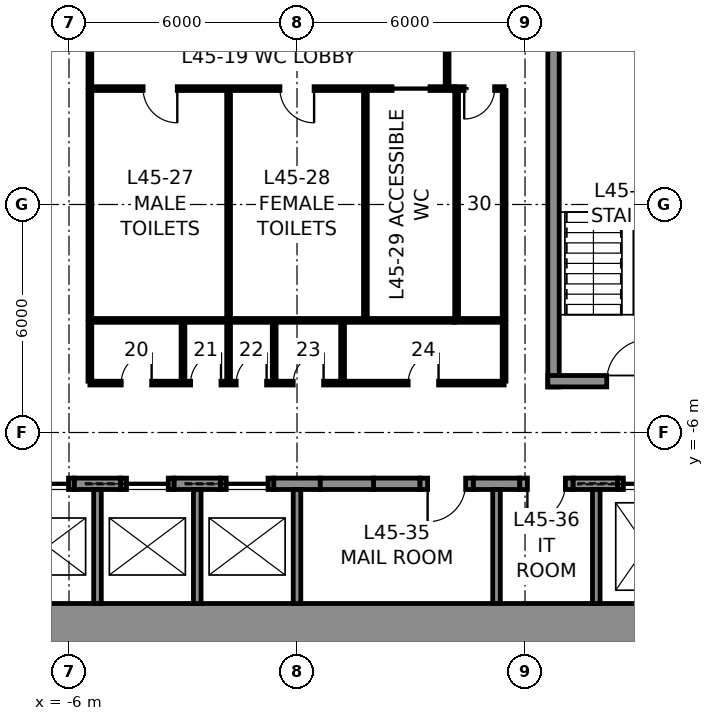
"""IFC4 building model, lengths in metres.
Left out: names, types, materials, properties, quantities, classifications, styles, units other than length and angle.
Written with IfcOpenShell. Run it as: python <this file> out.ifc"""

import sys

from ifc_helpers import new_model, si_unit, direction, frame, frame_2d, origin, place, context, subcontext, project, spatial, rectangle, extrude, element, fill, save


model = new_model("IFC4")
c1 = context("Model", 3, precision=1e-05, world=origin(), true_north=direction((0.0, 1.0)))
c2 = subcontext(c1, "Body", "Model", "MODEL_VIEW")
j1 = project(units=[si_unit("LENGTHUNIT", "METRE"), si_unit("PLANEANGLEUNIT", "RADIAN")], contexts=[c1])
p1 = place(None, origin())
s1 = spatial("IfcSite", under=j1, at=p1, CompositionType="ELEMENT")
p2 = place(p1, origin())
s2 = spatial("IfcBuilding", under=s1, at=p2, CompositionType="ELEMENT")
p3 = place(p2, frame((0.0, 0.0, 209.8)))
s3 = spatial("IfcBuildingStorey", under=s2, at=p3, CompositionType="ELEMENT", Elevation=209.8)
p4 = place(p3, frame((12.0, -11.25, 0.0), z_axis=(0.0, 0.0, 1.0), x_axis=(-1.0, 0.0, 0.0)))
e1 = element("IfcWall", 1, at=p4, inside=s3, PredefinedType="SHEAR", context=c2, shape_type="SweptSolid", body=[
    extrude(rectangle(XDim=24.0, YDim=1.5, at=frame_2d((12.0, 0.0))), origin(), (0.0, 0.0, 1.0), 4.0),
])
for number, where, z_axis, x_axis in (
    (2, (-5.863, -7.35, 0.0), (0.0, 0.0, 1.0), (1.0, 0.0, 0.0)),
    (3, (-3.238, -7.35, 0.0), (0.0, 0.0, 1.0), (1.0, 0.0, 0.0)),
    (4, (-0.613, -7.35, 0.0), (0.0, 0.0, 1.0), (1.0, 0.0, 0.0)),
    (5, (2.012, -7.35, 0.0), (0.0, 0.0, 1.0), (1.0, 0.0, 0.0)),
    (6, (4.637, -7.35, 0.0), (0.0, 0.0, 1.0), (1.0, 0.0, 0.0)),
):
    element("IfcWall", number, at=place(p3, frame(where, z_axis=z_axis, x_axis=x_axis)), inside=s3, PredefinedType="SHEAR", context=c2, shape_type="SweptSolid", body=[
        extrude(rectangle(XDim=1.225, YDim=0.3, at=frame_2d((0.613, 0.0))), origin(), (0.0, 0.0, 1.0), 4.0),
    ])
p5 = place(p3, frame((7.262, -7.35, 0.0), z_axis=(0.0, 0.0, 1.0), x_axis=(1.0, 0.0, 0.0)))
e7 = element("IfcWall", 7, at=p5, inside=s3, PredefinedType="SHEAR", context=c2, shape_type="SweptSolid", body=[
    extrude(rectangle(XDim=1.175, YDim=0.3, at=frame_2d((0.587, 0.0))), origin(), (0.0, 0.0, 1.0), 4.0),
])
p6 = place(p3, frame((-7.262, -7.35, 0.0), z_axis=(0.0, 0.0, 1.0), x_axis=(1.0, 0.0, 0.0)))
e8 = element("IfcWall", 8, at=p6, inside=s3, PredefinedType="PARTITIONING", context=c2, shape_type="SweptSolid", body=[
    extrude(rectangle(XDim=1.4, YDim=0.3, at=frame_2d((0.7, 0.0))), origin(), (0.0, 0.0, 1.0), 4.0),
])
p7 = place(p6, frame((0.15, 0.0, 0.0)))
e9 = element("IfcOpeningElement", 9, at=p7, cuts=e8, PredefinedType="OPENING", context=c2, shape_type="SweptSolid", body=[
    extrude(rectangle(XDim=1.1, YDim=2.3, at=frame_2d((0.55, 1.15))), frame((0.0, 0.16, 0.0), z_axis=(0.0, -1.0, 0.0), x_axis=(1.0, 0.0, 0.0)), (0.0, 0.0, 1.0), 0.32),
])
p8 = place(p3, frame((-4.637, -7.35, 0.0), z_axis=(0.0, 0.0, 1.0), x_axis=(1.0, 0.0, 0.0)))
e10 = element("IfcWall", 10, at=p8, inside=s3, PredefinedType="PARTITIONING", context=c2, shape_type="SweptSolid", body=[
    extrude(rectangle(XDim=1.4, YDim=0.3, at=frame_2d((0.7, 0.0))), origin(), (0.0, 0.0, 1.0), 4.0),
])
p9 = place(p8, frame((0.15, 0.0, 0.0)))
e11 = element("IfcOpeningElement", 11, at=p9, cuts=e10, PredefinedType="OPENING", context=c2, shape_type="SweptSolid", body=[
    extrude(rectangle(XDim=1.1, YDim=2.3, at=frame_2d((0.55, 1.15))), frame((0.0, 0.16, 0.0), z_axis=(0.0, -1.0, 0.0), x_axis=(1.0, 0.0, 0.0)), (0.0, 0.0, 1.0), 0.32),
])
p10 = place(p3, frame((-2.012, -7.35, 0.0), z_axis=(0.0, 0.0, 1.0), x_axis=(1.0, 0.0, 0.0)))
e12 = element("IfcWall", 12, at=p10, inside=s3, PredefinedType="PARTITIONING", context=c2, shape_type="SweptSolid", body=[
    extrude(rectangle(XDim=1.4, YDim=0.3, at=frame_2d((0.7, 0.0))), origin(), (0.0, 0.0, 1.0), 4.0),
])
p11 = place(p10, frame((0.15, 0.0, 0.0)))
e13 = element("IfcOpeningElement", 13, at=p11, cuts=e12, PredefinedType="OPENING", context=c2, shape_type="SweptSolid", body=[
    extrude(rectangle(XDim=1.1, YDim=2.3, at=frame_2d((0.55, 1.15))), frame((0.0, 0.16, 0.0), z_axis=(0.0, -1.0, 0.0), x_axis=(1.0, 0.0, 0.0)), (0.0, 0.0, 1.0), 0.32),
])
p12 = place(p3, frame((0.613, -7.35, 0.0), z_axis=(0.0, 0.0, 1.0), x_axis=(1.0, 0.0, 0.0)))
e14 = element("IfcWall", 14, at=p12, inside=s3, PredefinedType="PARTITIONING", context=c2, shape_type="SweptSolid", body=[
    extrude(rectangle(XDim=1.4, YDim=0.3, at=frame_2d((0.7, 0.0))), origin(), (0.0, 0.0, 1.0), 4.0),
])
p13 = place(p3, frame((3.238, -7.35, 0.0), z_axis=(0.0, 0.0, 1.0), x_axis=(1.0, 0.0, 0.0)))
e15 = element("IfcWall", 15, at=p13, inside=s3, PredefinedType="PARTITIONING", context=c2, shape_type="SweptSolid", body=[
    extrude(rectangle(XDim=1.4, YDim=0.3, at=frame_2d((0.7, 0.0))), origin(), (0.0, 0.0, 1.0), 4.0),
])
p14 = place(p13, frame((0.2, 0.0, 0.0)))
e16 = element("IfcOpeningElement", 16, at=p14, cuts=e15, PredefinedType="OPENING", context=c2, shape_type="SweptSolid", body=[
    extrude(rectangle(XDim=1.0, YDim=2.3, at=frame_2d((0.5, 1.15))), frame((0.0, 0.16, 0.0), z_axis=(0.0, -1.0, 0.0), x_axis=(1.0, 0.0, 0.0)), (0.0, 0.0, 1.0), 0.32),
])
p15 = place(p3, frame((5.863, -7.35, 0.0), z_axis=(0.0, 0.0, 1.0), x_axis=(1.0, 0.0, 0.0)))
e17 = element("IfcWall", 17, at=p15, inside=s3, PredefinedType="PARTITIONING", context=c2, shape_type="SweptSolid", body=[
    extrude(rectangle(XDim=1.4, YDim=0.3, at=frame_2d((0.7, 0.0))), origin(), (0.0, 0.0, 1.0), 4.0),
])
p16 = place(p15, frame((0.2, 0.0, 0.0)))
e18 = element("IfcOpeningElement", 18, at=p16, cuts=e17, PredefinedType="OPENING", context=c2, shape_type="SweptSolid", body=[
    extrude(rectangle(XDim=1.0, YDim=2.3, at=frame_2d((0.5, 1.15))), frame((0.0, 0.16, 0.0), z_axis=(0.0, -1.0, 0.0), x_axis=(1.0, 0.0, 0.0)), (0.0, 0.0, 1.0), 0.32),
])
p17 = place(p3, frame((8.438, -7.35, 0.0), z_axis=(0.0, 0.0, 1.0), x_axis=(1.0, 0.0, 0.0)))
e19 = element("IfcWall", 19, at=p17, inside=s3, PredefinedType="PARTITIONING", context=c2, shape_type="SweptSolid", body=[
    extrude(rectangle(XDim=1.5, YDim=0.3, at=frame_2d((0.75, 0.0))), origin(), (0.0, 0.0, 1.0), 4.0),
])
p18 = place(p17, frame((0.15, 0.0, 0.0)))
e20 = element("IfcOpeningElement", 20, at=p18, cuts=e19, PredefinedType="OPENING", context=c2, shape_type="SweptSolid", body=[
    extrude(rectangle(XDim=1.2, YDim=2.3, at=frame_2d((0.6, 1.15))), frame((0.0, 0.16, 0.0), z_axis=(0.0, -1.0, 0.0), x_axis=(1.0, 0.0, 0.0)), (0.0, 0.0, 1.0), 0.32),
])
for number, where, z_axis, x_axis in (
    (21, (-5.25, -10.5, 0.0), (0.0, 0.0, 1.0), (0.0, 1.0, 0.0)),
    (22, (-2.625, -10.5, 0.0), (0.0, 0.0, 1.0), (0.0, 1.0, 0.0)),
    (23, (0.0, -10.5, 0.0), (0.0, 0.0, 1.0), (0.0, 1.0, 0.0)),
    (24, (5.25, -10.5, 0.0), (0.0, 0.0, 1.0), (0.0, 1.0, 0.0)),
    (25, (7.875, -10.5, 0.0), (0.0, 0.0, 1.0), (0.0, 1.0, 0.0)),
):
    element("IfcWall", number, at=place(p3, frame(where, z_axis=z_axis, x_axis=x_axis)), inside=s3, PredefinedType="PARTITIONING", context=c2, shape_type="SweptSolid", body=[
        extrude(rectangle(XDim=3.0, YDim=0.2, at=frame_2d((1.5, 0.0))), origin(), (0.0, 0.0, 1.0), 4.0),
    ])
p19 = place(p3, frame((6.75, -4.8, 0.0), z_axis=(0.0, 0.0, 1.0), x_axis=(0.0, 1.0, 0.0)))
e26 = element("IfcWall", 26, at=p19, inside=s3, PredefinedType="SOLIDWALL", context=c2, shape_type="SweptSolid", body=[
    extrude(rectangle(XDim=9.6, YDim=0.3, at=frame_2d((4.8, 0.0))), origin(), (0.0, 0.0, 1.0), 3.75),
])
p20 = place(p3, frame((10.5, -4.65, 0.0), z_axis=(0.0, 0.0, 1.0), x_axis=(-1.0, 0.0, 0.0)))
e27 = element("IfcWall", 27, at=p20, inside=s3, PredefinedType="SOLIDWALL", context=c2, shape_type="SweptSolid", body=[
    extrude(rectangle(XDim=3.9, YDim=0.3, at=frame_2d((1.95, 0.0))), origin(), (0.0, 0.0, 1.0), 3.75),
])
p21 = place(p20, frame((1.25, 0.0, 0.0)))
e28 = element("IfcOpeningElement", 28, at=p21, cuts=e27, PredefinedType="OPENING", context=c2, shape_type="SweptSolid", body=[
    extrude(rectangle(XDim=1.1, YDim=2.3, at=frame_2d((0.55, 1.15))), frame((0.0, 0.16, 0.0), z_axis=(0.0, -1.0, 0.0), x_axis=(1.0, 0.0, 0.0)), (0.0, 0.0, 1.0), 0.32),
])
p22 = place(p3, frame((-5.45, 3.05, 0.0), z_axis=(0.0, 0.0, 1.0), x_axis=(1.0, 0.0, 0.0)))
e29 = element("IfcWall", 29, at=p22, inside=s3, PredefinedType="PARTITIONING", context=c2, shape_type="SweptSolid", body=[
    extrude(rectangle(XDim=9.6, YDim=0.1, at=frame_2d((4.8, 0.0))), origin(), (0.0, 0.0, 1.0), 3.75),
])
p23 = place(p22, frame((1.4, 0.0, 0.0)))
e30 = element("IfcOpeningElement", 30, at=p23, cuts=e29, PredefinedType="OPENING", context=c2, shape_type="SweptSolid", body=[
    extrude(rectangle(XDim=0.9, YDim=2.3, at=frame_2d((0.45, 1.15))), frame((0.0, 0.06, 0.0), z_axis=(0.0, -1.0, 0.0), x_axis=(1.0, 0.0, 0.0)), (0.0, 0.0, 1.0), 0.12),
])
p24 = place(p22, frame((5.0, 0.0, 0.0)))
e31 = element("IfcOpeningElement", 31, at=p24, cuts=e29, PredefinedType="OPENING", context=c2, shape_type="SweptSolid", body=[
    extrude(rectangle(XDim=0.9, YDim=2.3, at=frame_2d((0.45, 1.15))), frame((0.0, 0.06, 0.0), z_axis=(0.0, -1.0, 0.0), x_axis=(1.0, 0.0, 0.0)), (0.0, 0.0, 1.0), 0.12),
])
p25 = place(p22, frame((7.95, 0.0, 0.0)))
e32 = element("IfcOpeningElement", 32, at=p25, cuts=e29, PredefinedType="OPENING", context=c2, shape_type="SweptSolid", body=[
    extrude(rectangle(XDim=1.0, YDim=2.3, at=frame_2d((0.5, 1.15))), frame((0.0, 0.06, 0.0), z_axis=(0.0, -1.0, 0.0), x_axis=(1.0, 0.0, 0.0)), (0.0, 0.0, 1.0), 0.12),
])
p26 = place(p3, frame((4.15, 3.05, 0.0), z_axis=(0.0, 0.0, 1.0), x_axis=(1.0, 0.0, 0.0)))
e33 = element("IfcWall", 33, at=p26, inside=s3, PredefinedType="PARTITIONING", context=c2, shape_type="SweptSolid", body=[
    extrude(rectangle(XDim=1.3, YDim=0.1, at=frame_2d((0.65, 0.0))), origin(), (0.0, 0.0, 1.0), 3.75),
])
p27 = place(p26, frame((0.25, 0.0, 0.0)))
e34 = element("IfcOpeningElement", 34, at=p27, cuts=e33, PredefinedType="OPENING", context=c2, shape_type="SweptSolid", body=[
    extrude(rectangle(XDim=0.8, YDim=2.3, at=frame_2d((0.4, 1.15))), frame((0.0, 0.06, 0.0), z_axis=(0.0, -1.0, 0.0), x_axis=(1.0, 0.0, 0.0)), (0.0, 0.0, 1.0), 0.12),
])
p28 = place(p3, frame((4.15, -3.05, 0.0), z_axis=(0.0, 0.0, 1.0), x_axis=(-1.0, 0.0, 0.0)))
e35 = element("IfcWall", 35, at=p28, inside=s3, PredefinedType="PARTITIONING", context=c2, shape_type="SweptSolid", body=[
    extrude(rectangle(XDim=9.6, YDim=0.1, at=frame_2d((4.8, 0.0))), origin(), (0.0, 0.0, 1.0), 3.75),
])
p29 = place(p3, frame((5.45, -3.05, 0.0), z_axis=(0.0, 0.0, 1.0), x_axis=(-1.0, 0.0, 0.0)))
e36 = element("IfcWall", 36, at=p29, inside=s3, PredefinedType="PARTITIONING", context=c2, shape_type="SweptSolid", body=[
    extrude(rectangle(XDim=1.3, YDim=0.1, at=frame_2d((0.65, 0.0))), origin(), (0.0, 0.0, 1.0), 3.75),
])
for number, where, z_axis, x_axis in (
    (37, (5.45, 3.0, 0.0), (0.0, 0.0, 1.0), (0.0, -1.0, 0.0)),
    (38, (-5.45, -3.0, 0.0), (0.0, 0.0, 1.0), (0.0, 1.0, 0.0)),
    (39, (-1.8, -3.0, 0.0), (0.0, 0.0, 1.0), (0.0, 1.0, 0.0)),
    (40, (1.8, -3.0, 0.0), (0.0, 0.0, 1.0), (0.0, 1.0, 0.0)),
    (41, (4.2, -3.0, 0.0), (0.0, 0.0, 1.0), (0.0, 1.0, 0.0)),
):
    element("IfcWall", number, at=place(p3, frame(where, z_axis=z_axis, x_axis=x_axis)), inside=s3, PredefinedType="PARTITIONING", context=c2, shape_type="SweptSolid", body=[
        extrude(rectangle(XDim=6.0, YDim=0.1, at=frame_2d((3.0, 0.0))), origin(), (0.0, 0.0, 1.0), 3.75),
    ])
for number, where, z_axis, x_axis in (
    (42, (-5.45, 3.1, 0.0), (0.0, 0.0, 1.0), (0.0, 1.0, 0.0)),
    (43, (3.95, 3.1, 0.0), (0.0, 0.0, 1.0), (0.0, 1.0, 0.0)),
):
    element("IfcWall", number, at=place(p3, frame(where, z_axis=z_axis, x_axis=x_axis)), inside=s3, PredefinedType="PARTITIONING", context=c2, shape_type="SweptSolid", body=[
        extrude(rectangle(XDim=1.55, YDim=0.1, at=frame_2d((0.775, 0.0))), origin(), (0.0, 0.0, 1.0), 3.75),
    ])
p30 = place(p3, frame((5.45, -4.7, 0.0), z_axis=(0.0, 0.0, 1.0), x_axis=(-1.0, 0.0, 0.0)))
e44 = element("IfcWall", 44, at=p30, inside=s3, PredefinedType="PARTITIONING", context=c2, shape_type="SweptSolid", body=[
    extrude(rectangle(XDim=10.9, YDim=0.1, at=frame_2d((5.45, 0.0))), origin(), (0.0, 0.0, 1.0), 3.75),
])
p31 = place(p30, frame((9.275, 0.0, 0.0)))
e45 = element("IfcOpeningElement", 45, at=p31, cuts=e44, PredefinedType="OPENING", context=c2, shape_type="SweptSolid", body=[
    extrude(rectangle(XDim=0.8, YDim=2.3, at=frame_2d((0.4, 1.15))), frame((0.0, 0.06, 0.0), z_axis=(0.0, -1.0, 0.0), x_axis=(1.0, 0.0, 0.0)), (0.0, 0.0, 1.0), 0.12),
])
p32 = place(p30, frame((7.45, 0.0, 0.0)))
e46 = element("IfcOpeningElement", 46, at=p32, cuts=e44, PredefinedType="OPENING", context=c2, shape_type="SweptSolid", body=[
    extrude(rectangle(XDim=0.8, YDim=2.3, at=frame_2d((0.4, 1.15))), frame((0.0, 0.06, 0.0), z_axis=(0.0, -1.0, 0.0), x_axis=(1.0, 0.0, 0.0)), (0.0, 0.0, 1.0), 0.12),
])
p33 = place(p30, frame((6.25, 0.0, 0.0)))
e47 = element("IfcOpeningElement", 47, at=p33, cuts=e44, PredefinedType="OPENING", context=c2, shape_type="SweptSolid", body=[
    extrude(rectangle(XDim=0.8, YDim=2.3, at=frame_2d((0.4, 1.15))), frame((0.0, 0.06, 0.0), z_axis=(0.0, -1.0, 0.0), x_axis=(1.0, 0.0, 0.0)), (0.0, 0.0, 1.0), 0.12),
])
p34 = place(p30, frame((4.75, 0.0, 0.0)))
e48 = element("IfcOpeningElement", 48, at=p34, cuts=e44, PredefinedType="OPENING", context=c2, shape_type="SweptSolid", body=[
    extrude(rectangle(XDim=0.8, YDim=2.3, at=frame_2d((0.4, 1.15))), frame((0.0, 0.06, 0.0), z_axis=(0.0, -1.0, 0.0), x_axis=(1.0, 0.0, 0.0)), (0.0, 0.0, 1.0), 0.12),
])
p35 = place(p30, frame((1.725, 0.0, 0.0)))
e49 = element("IfcOpeningElement", 49, at=p35, cuts=e44, PredefinedType="OPENING", context=c2, shape_type="SweptSolid", body=[
    extrude(rectangle(XDim=0.8, YDim=2.3, at=frame_2d((0.4, 1.15))), frame((0.0, 0.06, 0.0), z_axis=(0.0, -1.0, 0.0), x_axis=(1.0, 0.0, 0.0)), (0.0, 0.0, 1.0), 0.12),
])
for number, where, z_axis, x_axis in (
    (50, (-5.45, -3.1, 0.0), (0.0, 0.0, 1.0), (0.0, -1.0, 0.0)),
    (51, (5.45, -3.1, 0.0), (0.0, 0.0, 1.0), (0.0, -1.0, 0.0)),
    (52, (-3.0, -3.1, 0.0), (0.0, 0.0, 1.0), (0.0, -1.0, 0.0)),
    (53, (-1.8, -3.1, 0.0), (0.0, 0.0, 1.0), (0.0, -1.0, 0.0)),
    (54, (-0.6, -3.1, 0.0), (0.0, 0.0, 1.0), (0.0, -1.0, 0.0)),
    (55, (1.2, -3.1, 0.0), (0.0, 0.0, 1.0), (0.0, -1.0, 0.0)),
):
    element("IfcWall", number, at=place(p3, frame(where, z_axis=z_axis, x_axis=x_axis)), inside=s3, PredefinedType="PARTITIONING", context=c2, shape_type="SweptSolid", body=[
        extrude(rectangle(XDim=1.55, YDim=0.1, at=frame_2d((0.775, 0.0))), origin(), (0.0, 0.0, 1.0), 3.75),
    ])
p36 = place(p21, frame((1.1, 0.0, 0.0), z_axis=(0.0, 0.0, 1.0), x_axis=(-1.0, 0.0, 0.0)))
e56 = element("IfcDoor", 56, at=p36, inside=s3, OperationType="SINGLE_SWING_RIGHT", PredefinedType="DOOR", context=c2, shape_type="SweptSolid", body=[
    extrude(rectangle(XDim=1.1, YDim=2.3, at=frame_2d((0.55, 1.15))), frame((0.0, 0.025, 0.0), z_axis=(0.0, -1.0, 0.0), x_axis=(1.0, 0.0, 0.0)), (0.0, 0.0, 1.0), 0.05),
])
fill(e28, e56)
p37 = place(p23, frame((0.9, 0.0, 0.0), z_axis=(0.0, 0.0, 1.0), x_axis=(-1.0, 0.0, 0.0)))
e57 = element("IfcDoor", 57, at=p37, inside=s3, OperationType="SINGLE_SWING_LEFT", PredefinedType="DOOR", context=c2, shape_type="SweptSolid", body=[
    extrude(rectangle(XDim=0.9, YDim=2.3, at=frame_2d((0.45, 1.15))), frame((0.0, 0.025, 0.0), z_axis=(0.0, -1.0, 0.0), x_axis=(1.0, 0.0, 0.0)), (0.0, 0.0, 1.0), 0.05),
])
fill(e30, e57)
p38 = place(p24, frame((0.9, 0.0, 0.0), z_axis=(0.0, 0.0, 1.0), x_axis=(-1.0, 0.0, 0.0)))
e58 = element("IfcDoor", 58, at=p38, inside=s3, OperationType="SINGLE_SWING_LEFT", PredefinedType="DOOR", context=c2, shape_type="SweptSolid", body=[
    extrude(rectangle(XDim=0.9, YDim=2.3, at=frame_2d((0.45, 1.15))), frame((0.0, 0.025, 0.0), z_axis=(0.0, -1.0, 0.0), x_axis=(1.0, 0.0, 0.0)), (0.0, 0.0, 1.0), 0.05),
])
fill(e31, e58)
p39 = place(p25, frame((1.0, 0.0, 0.0), z_axis=(0.0, 0.0, 1.0), x_axis=(-1.0, 0.0, 0.0)))
e59 = element("IfcDoor", 59, at=p39, inside=s3, OperationType="SLIDING_TO_LEFT", PredefinedType="DOOR", context=c2, shape_type="SweptSolid", body=[
    extrude(rectangle(XDim=1.0, YDim=2.3, at=frame_2d((0.5, 1.15))), frame((0.0, 0.025, 0.0), z_axis=(0.0, -1.0, 0.0), x_axis=(1.0, 0.0, 0.0)), (0.0, 0.0, 1.0), 0.05),
])
fill(e32, e59)
p40 = place(p27, frame((0.8, 0.0, 0.0), z_axis=(0.0, 0.0, 1.0), x_axis=(-1.0, 0.0, 0.0)))
e60 = element("IfcDoor", 60, at=p40, inside=s3, OperationType="SINGLE_SWING_RIGHT", PredefinedType="DOOR", context=c2, shape_type="SweptSolid", body=[
    extrude(rectangle(XDim=0.8, YDim=2.3, at=frame_2d((0.4, 1.15))), frame((0.0, 0.025, 0.0), z_axis=(0.0, -1.0, 0.0), x_axis=(1.0, 0.0, 0.0)), (0.0, 0.0, 1.0), 0.05),
])
fill(e34, e60)
p41 = place(p31, frame((0.8, 0.0, 0.0), z_axis=(0.0, 0.0, 1.0), x_axis=(-1.0, 0.0, 0.0)))
e61 = element("IfcDoor", 61, at=p41, inside=s3, OperationType="SINGLE_SWING_RIGHT", PredefinedType="DOOR", context=c2, shape_type="SweptSolid", body=[
    extrude(rectangle(XDim=0.8, YDim=2.3, at=frame_2d((0.4, 1.15))), frame((0.0, 0.025, 0.0), z_axis=(0.0, -1.0, 0.0), x_axis=(1.0, 0.0, 0.0)), (0.0, 0.0, 1.0), 0.05),
])
fill(e45, e61)
p42 = place(p32, frame((0.8, 0.0, 0.0), z_axis=(0.0, 0.0, 1.0), x_axis=(-1.0, 0.0, 0.0)))
e62 = element("IfcDoor", 62, at=p42, inside=s3, OperationType="SINGLE_SWING_RIGHT", PredefinedType="DOOR", context=c2, shape_type="SweptSolid", body=[
    extrude(rectangle(XDim=0.8, YDim=2.3, at=frame_2d((0.4, 1.15))), frame((0.0, 0.025, 0.0), z_axis=(0.0, -1.0, 0.0), x_axis=(1.0, 0.0, 0.0)), (0.0, 0.0, 1.0), 0.05),
])
fill(e46, e62)
p43 = place(p33, frame((0.8, 0.0, 0.0), z_axis=(0.0, 0.0, 1.0), x_axis=(-1.0, 0.0, 0.0)))
e63 = element("IfcDoor", 63, at=p43, inside=s3, OperationType="SINGLE_SWING_RIGHT", PredefinedType="DOOR", context=c2, shape_type="SweptSolid", body=[
    extrude(rectangle(XDim=0.8, YDim=2.3, at=frame_2d((0.4, 1.15))), frame((0.0, 0.025, 0.0), z_axis=(0.0, -1.0, 0.0), x_axis=(1.0, 0.0, 0.0)), (0.0, 0.0, 1.0), 0.05),
])
fill(e47, e63)
p44 = place(p34, frame((0.8, 0.0, 0.0), z_axis=(0.0, 0.0, 1.0), x_axis=(-1.0, 0.0, 0.0)))
e64 = element("IfcDoor", 64, at=p44, inside=s3, OperationType="SINGLE_SWING_RIGHT", PredefinedType="DOOR", context=c2, shape_type="SweptSolid", body=[
    extrude(rectangle(XDim=0.8, YDim=2.3, at=frame_2d((0.4, 1.15))), frame((0.0, 0.025, 0.0), z_axis=(0.0, -1.0, 0.0), x_axis=(1.0, 0.0, 0.0)), (0.0, 0.0, 1.0), 0.05),
])
fill(e48, e64)
p45 = place(p35, frame((0.8, 0.0, 0.0), z_axis=(0.0, 0.0, 1.0), x_axis=(-1.0, 0.0, 0.0)))
e65 = element("IfcDoor", 65, at=p45, inside=s3, OperationType="SINGLE_SWING_RIGHT", PredefinedType="DOOR", context=c2, shape_type="SweptSolid", body=[
    extrude(rectangle(XDim=0.8, YDim=2.3, at=frame_2d((0.4, 1.15))), frame((0.0, 0.025, 0.0), z_axis=(0.0, -1.0, 0.0), x_axis=(1.0, 0.0, 0.0)), (0.0, 0.0, 1.0), 0.05),
])
fill(e49, e65)
p46 = place(p14, frame((1.0, 0.0, 0.0), z_axis=(0.0, 0.0, 1.0), x_axis=(-1.0, 0.0, 0.0)))
e66 = element("IfcDoor", 66, at=p46, inside=s3, OperationType="SINGLE_SWING_RIGHT", PredefinedType="DOOR", context=c2, shape_type="SweptSolid", body=[
    extrude(rectangle(XDim=1.0, YDim=2.3, at=frame_2d((0.5, 1.15))), frame((0.0, 0.025, 0.0), z_axis=(0.0, -1.0, 0.0), x_axis=(1.0, 0.0, 0.0)), (0.0, 0.0, 1.0), 0.05),
])
fill(e16, e66)
p47 = place(p16, frame((1.0, 0.0, 0.0), z_axis=(0.0, 0.0, 1.0), x_axis=(-1.0, 0.0, 0.0)))
e67 = element("IfcDoor", 67, at=p47, inside=s3, OperationType="SINGLE_SWING_RIGHT", PredefinedType="DOOR", context=c2, shape_type="SweptSolid", body=[
    extrude(rectangle(XDim=1.0, YDim=2.3, at=frame_2d((0.5, 1.15))), frame((0.0, 0.025, 0.0), z_axis=(0.0, -1.0, 0.0), x_axis=(1.0, 0.0, 0.0)), (0.0, 0.0, 1.0), 0.05),
])
fill(e18, e67)
p48 = place(p18, origin())
e68 = element("IfcDoor", 68, at=p48, inside=s3, OperationType="SLIDING_TO_LEFT", PredefinedType="DOOR", context=c2, shape_type="SweptSolid", body=[
    extrude(rectangle(XDim=1.2, YDim=2.3, at=frame_2d((0.6, 1.15))), frame((0.0, 0.025, 0.0), z_axis=(0.0, -1.0, 0.0), x_axis=(1.0, 0.0, 0.0)), (0.0, 0.0, 1.0), 0.05),
])
fill(e20, e68)
p49 = place(p11, origin())
e69 = element("IfcDoor", 69, at=p49, inside=s3, OperationType="SLIDING_TO_LEFT", PredefinedType="DOOR", context=c2, shape_type="SweptSolid", body=[
    extrude(rectangle(XDim=1.1, YDim=2.3, at=frame_2d((0.55, 1.15))), frame((0.0, 0.025, 0.0), z_axis=(0.0, -1.0, 0.0), x_axis=(1.0, 0.0, 0.0)), (0.0, 0.0, 1.0), 0.05),
])
fill(e13, e69)
p50 = place(p9, origin())
e70 = element("IfcDoor", 70, at=p50, inside=s3, OperationType="SLIDING_TO_LEFT", PredefinedType="DOOR", context=c2, shape_type="SweptSolid", body=[
    extrude(rectangle(XDim=1.1, YDim=2.3, at=frame_2d((0.55, 1.15))), frame((0.0, 0.025, 0.0), z_axis=(0.0, -1.0, 0.0), x_axis=(1.0, 0.0, 0.0)), (0.0, 0.0, 1.0), 0.05),
])
fill(e11, e70)
p51 = place(p7, origin())
e71 = element("IfcDoor", 71, at=p51, inside=s3, OperationType="SLIDING_TO_LEFT", PredefinedType="DOOR", context=c2, shape_type="SweptSolid", body=[
    extrude(rectangle(XDim=1.1, YDim=2.3, at=frame_2d((0.55, 1.15))), frame((0.0, 0.025, 0.0), z_axis=(0.0, -1.0, 0.0), x_axis=(1.0, 0.0, 0.0)), (0.0, 0.0, 1.0), 0.05),
])
fill(e9, e71)
save(model, sys.argv[1])
